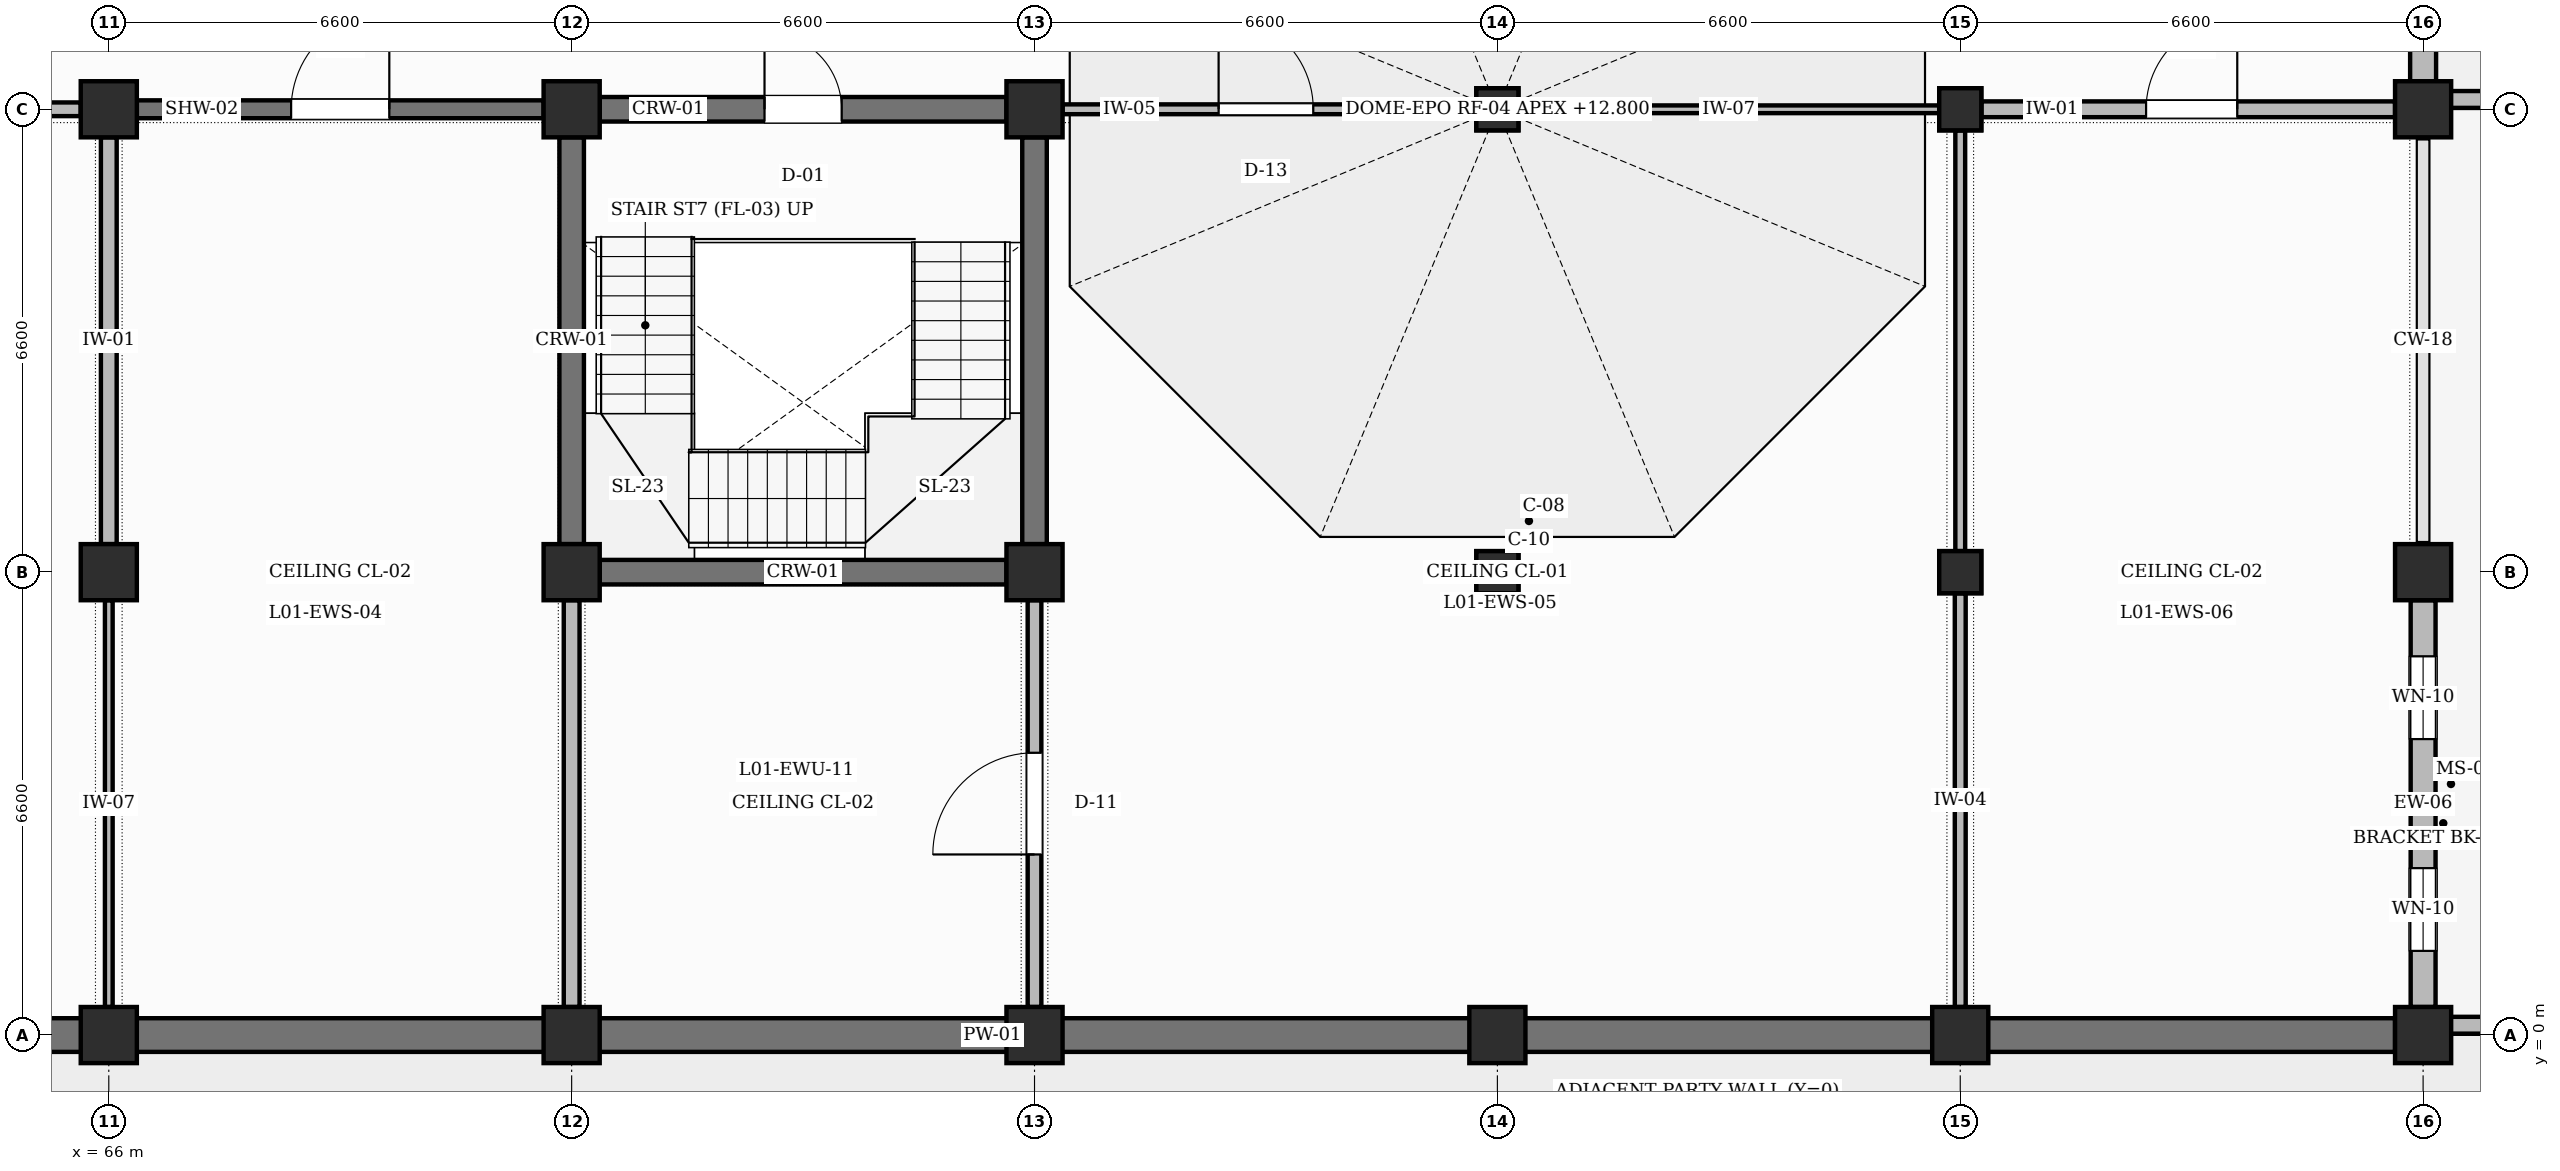
"""IFC4 building model, lengths in metres.
Left out: names, types, materials, properties, quantities, classifications, styles, units other than length and angle.
Written with IfcOpenShell. Run it as: python <this file> out.ifc"""

import sys

from ifc_helpers import new_model, si_unit, direction, frame, frame_2d, origin, origin_2d, place, context, subcontext, project, spatial, rectangle, circle, extrude, element, fill, save


model = new_model("IFC4")
c1 = context("Model", 3, precision=1e-05, world=origin(), true_north=direction((0.0, 1.0)))
c2 = subcontext(c1, "Body", "Model", "MODEL_VIEW")
j1 = project(units=[si_unit("LENGTHUNIT", "METRE"), si_unit("PLANEANGLEUNIT", "RADIAN")], contexts=[c1])
p1 = place(None, origin())
s1 = spatial("IfcSite", under=j1, at=p1, CompositionType="ELEMENT")
p2 = place(p1, origin())
s2 = spatial("IfcBuilding", under=s1, at=p2, CompositionType="ELEMENT")
p3 = place(p2, frame((0.0, 0.0, 5.4)))
s3 = spatial("IfcBuildingStorey", under=s2, at=p3, CompositionType="ELEMENT", Elevation=5.4)
for number, where, z_axis, x_axis in (
    (1, (66.0, 0.0, 0.0), (0.0, 0.0, 1.0), (1.0, 0.0, 0.0)),
    (2, (66.0, 6.6, 0.0), (0.0, 0.0, 1.0), (1.0, 0.0, 0.0)),
    (3, (66.0, 13.2, 0.0), (0.0, 0.0, 1.0), (1.0, 0.0, 0.0)),
    (4, (72.6, 0.0, 0.0), (0.0, 0.0, 1.0), (1.0, 0.0, 0.0)),
    (5, (72.6, 6.6, 0.0), (0.0, 0.0, 1.0), (1.0, 0.0, 0.0)),
    (6, (72.6, 13.2, 0.0), (0.0, 0.0, 1.0), (1.0, 0.0, 0.0)),
    (7, (79.2, 0.0, 0.0), (0.0, 0.0, 1.0), (1.0, 0.0, 0.0)),
    (8, (79.2, 6.6, 0.0), (0.0, 0.0, 1.0), (1.0, 0.0, 0.0)),
    (9, (79.2, 13.2, 0.0), (0.0, 0.0, 1.0), (1.0, 0.0, 0.0)),
    (10, (85.8, 0.0, 0.0), (0.0, 0.0, 1.0), (1.0, 0.0, 0.0)),
):
    element("IfcColumn", number, at=place(p3, frame(where, z_axis=z_axis, x_axis=x_axis)), inside=s3, PredefinedType="COLUMN", context=c2, shape_type="SweptSolid", body=[
        extrude(rectangle(XDim=0.8, YDim=0.8, at=origin_2d()), origin(), (0.0, 0.0, 1.0), 4.8),
    ])
for number, where, z_axis, x_axis in (
    (11, (85.8, 6.6, 0.0), (0.0, 0.0, 1.0), (1.0, 0.0, 0.0)),
    (12, (85.8, 13.2, 0.0), (0.0, 0.0, 1.0), (1.0, 0.0, 0.0)),
):
    element("IfcColumn", number, at=place(p3, frame(where, z_axis=z_axis, x_axis=x_axis)), inside=s3, PredefinedType="COLUMN", context=c2, shape_type="SweptSolid", body=[
        extrude(circle(Radius=0.3, at=origin_2d()), origin(), (0.0, 0.0, 1.0), 4.8),
    ])
p4 = place(p3, frame((92.4, 0.0, 0.0), z_axis=(0.0, 0.0, 1.0), x_axis=(1.0, 0.0, 0.0)))
e13 = element("IfcColumn", 13, at=p4, inside=s3, PredefinedType="COLUMN", context=c2, shape_type="SweptSolid", body=[
    extrude(rectangle(XDim=0.8, YDim=0.8, at=origin_2d()), origin(), (0.0, 0.0, 1.0), 4.8),
])
for number, where, z_axis, x_axis in (
    (14, (92.4, 6.6, 0.0), (0.0, 0.0, 1.0), (1.0, 0.0, 0.0)),
    (15, (92.4, 13.2, 0.0), (0.0, 0.0, 1.0), (1.0, 0.0, 0.0)),
):
    element("IfcColumn", number, at=place(p3, frame(where, z_axis=z_axis, x_axis=x_axis)), inside=s3, PredefinedType="COLUMN", context=c2, shape_type="SweptSolid", body=[
        extrude(circle(Radius=0.3, at=origin_2d()), origin(), (0.0, 0.0, 1.0), 4.8),
    ])
for number, where, z_axis, x_axis in (
    (16, (99.0, 0.0, 0.0), (0.0, 0.0, 1.0), (1.0, 0.0, 0.0)),
    (17, (99.0, 6.6, 0.0), (0.0, 0.0, 1.0), (1.0, 0.0, 0.0)),
    (18, (99.0, 13.2, 0.0), (0.0, 0.0, 1.0), (1.0, 0.0, 0.0)),
):
    element("IfcColumn", number, at=place(p3, frame(where, z_axis=z_axis, x_axis=x_axis)), inside=s3, PredefinedType="COLUMN", context=c2, shape_type="SweptSolid", body=[
        extrude(rectangle(XDim=0.8, YDim=0.8, at=origin_2d()), origin(), (0.0, 0.0, 1.0), 4.8),
    ])
for number, where, z_axis, x_axis in (
    (19, (85.8, 6.6, 4.8), (0.0, 0.0, 1.0), (1.0, 0.0, 0.0)),
    (20, (92.4, 6.6, 4.8), (0.0, 0.0, 1.0), (1.0, 0.0, 0.0)),
    (21, (92.4, 13.2, 4.8), (0.0, 0.0, 1.0), (1.0, 0.0, 0.0)),
):
    element("IfcColumn", number, at=place(p3, frame(where, z_axis=z_axis, x_axis=x_axis)), inside=s3, PredefinedType="COLUMN", context=c2, shape_type="SweptSolid", body=[
        extrude(rectangle(XDim=0.6, YDim=0.6, at=origin_2d()), origin(), (0.0, 0.0, 1.0), 0.65),
    ])
p5 = place(p3, frame((85.8, 13.2, 4.8), z_axis=(0.0, 0.0, 1.0), x_axis=(1.0, 0.0, 0.0)))
e22 = element("IfcColumn", 22, at=p5, inside=s3, PredefinedType="COLUMN", context=c2, shape_type="SweptSolid", body=[
    extrude(rectangle(XDim=0.6, YDim=0.6, at=origin_2d()), origin(), (0.0, 0.0, 1.0), 2.26),
])
for number, where, z_axis, x_axis in (
    (23, (59.8, 0.0, 0.0), (0.0, 0.0, 1.0), (1.0, 0.0, 0.0)),
    (24, (66.4, 0.0, 0.0), (0.0, 0.0, 1.0), (1.0, 0.0, 0.0)),
    (25, (73.0, 0.0, 0.0), (0.0, 0.0, 1.0), (1.0, 0.0, 0.0)),
):
    element("IfcWall", number, at=place(p3, frame(where, z_axis=z_axis, x_axis=x_axis)), inside=s3, PredefinedType="SOLIDWALL", context=c2, shape_type="SweptSolid", body=[
        extrude(rectangle(XDim=5.8, YDim=0.48, at=frame_2d((2.9, 0.0))), origin(), (0.0, 0.0, 1.0), 3.85),
    ])
p6 = place(p3, frame((79.6, 0.0, 0.0), z_axis=(0.0, 0.0, 1.0), x_axis=(1.0, 0.0, 0.0)))
e26 = element("IfcWall", 26, at=p6, inside=s3, PredefinedType="SOLIDWALL", context=c2, shape_type="SweptSolid", body=[
    extrude(rectangle(XDim=5.8, YDim=0.48, at=frame_2d((2.9, 0.0))), origin(), (0.0, 0.0, 1.0), 3.85),
])
for number, where, z_axis, x_axis in (
    (27, (86.2, 0.0, 0.0), (0.0, 0.0, 1.0), (1.0, 0.0, 0.0)),
    (28, (92.8, 0.0, 0.0), (0.0, 0.0, 1.0), (1.0, 0.0, 0.0)),
):
    element("IfcWall", number, at=place(p3, frame(where, z_axis=z_axis, x_axis=x_axis)), inside=s3, PredefinedType="SOLIDWALL", context=c2, shape_type="SweptSolid", body=[
        extrude(rectangle(XDim=5.8, YDim=0.48, at=frame_2d((2.9, 0.0))), origin(), (0.0, 0.0, 1.0), 3.85),
    ])
p7 = place(p3, frame((99.0, 0.4, 0.0), z_axis=(0.0, 0.0, 1.0), x_axis=(0.0, 1.0, 0.0)))
e29 = element("IfcWall", 29, at=p7, inside=s3, PredefinedType="SOLIDWALL", context=c2, shape_type="SweptSolid", body=[
    extrude(rectangle(XDim=5.8, YDim=0.355, at=frame_2d((2.9, 0.0))), origin(), (0.0, 0.0, 1.0), 3.85),
])
p8 = place(p7, frame((0.8, 0.0, 0.95)))
e30 = element("IfcOpeningElement", 30, at=p8, cuts=e29, PredefinedType="OPENING", context=c2, shape_type="SweptSolid", body=[
    extrude(rectangle(XDim=1.18, YDim=1.52, at=frame_2d((0.59, 0.76))), frame((0.0, 0.188, 0.0), z_axis=(0.0, -1.0, 0.0), x_axis=(1.0, 0.0, 0.0)), (0.0, 0.0, 1.0), 0.375),
])
p9 = place(p7, frame((3.82, 0.0, 0.95)))
e31 = element("IfcOpeningElement", 31, at=p9, cuts=e29, PredefinedType="OPENING", context=c2, shape_type="SweptSolid", body=[
    extrude(rectangle(XDim=1.18, YDim=1.52, at=frame_2d((0.59, 0.76))), frame((0.0, 0.188, 0.0), z_axis=(0.0, -1.0, 0.0), x_axis=(1.0, 0.0, 0.0)), (0.0, 0.0, 1.0), 0.375),
])
p10 = place(p3, frame((99.0, 13.6, 0.0), z_axis=(0.0, 0.0, 1.0), x_axis=(0.0, 1.0, 0.0)))
e32 = element("IfcWall", 32, at=p10, inside=s3, PredefinedType="SOLIDWALL", context=c2, shape_type="SweptSolid", body=[
    extrude(rectangle(XDim=5.8, YDim=0.37, at=frame_2d((2.9, 0.0))), origin(), (0.0, 0.0, 1.0), 3.85),
])
p11 = place(p10, frame((2.275, 0.0, 0.0)))
e33 = element("IfcOpeningElement", 33, at=p11, cuts=e32, PredefinedType="OPENING", context=c2, shape_type="SweptSolid", body=[
    extrude(rectangle(XDim=1.25, YDim=2.2, at=frame_2d((0.625, 1.1))), frame((0.0, 0.195, 0.0), z_axis=(0.0, -1.0, 0.0), x_axis=(1.0, 0.0, 0.0)), (0.0, 0.0, 1.0), 0.39),
])
for number, where, z_axis, x_axis in (
    (34, (99.14, 13.34, 0.0), (0.0, 0.0, 1.0), (1.0, 0.0, 0.0)),
    (35, (99.14, 0.14, 0.0), (0.0, 0.0, 1.0), (1.0, 0.0, 0.0)),
):
    element("IfcWall", number, at=place(p3, frame(where, z_axis=z_axis, x_axis=x_axis)), inside=s3, PredefinedType="PARAPET", context=c2, shape_type="SweptSolid", body=[
        extrude(rectangle(XDim=6.32, YDim=0.24, at=frame_2d((3.16, 0.0))), origin(), (0.0, 0.0, 1.0), 1.15),
    ])
p12 = place(p3, frame((73.0, 6.6, 0.0), z_axis=(0.0, 0.0, 1.0), x_axis=(1.0, 0.0, 0.0)))
e36 = element("IfcWall", 36, at=p12, inside=s3, PredefinedType="SHEAR", context=c2, shape_type="SweptSolid", body=[
    extrude(rectangle(XDim=5.8, YDim=0.35, at=frame_2d((2.9, 0.0))), origin(), (0.0, 0.0, 1.0), 3.6),
])
p13 = place(p3, frame((73.0, 13.2, 0.0), z_axis=(0.0, 0.0, 1.0), x_axis=(1.0, 0.0, 0.0)))
e37 = element("IfcWall", 37, at=p13, inside=s3, PredefinedType="SHEAR", context=c2, shape_type="SweptSolid", body=[
    extrude(rectangle(XDim=5.8, YDim=0.35, at=frame_2d((2.9, 0.0))), origin(), (0.0, 0.0, 1.0), 3.7),
])
p14 = place(p13, frame((2.35, 0.0, 0.0)))
e38 = element("IfcOpeningElement", 38, at=p14, cuts=e37, PredefinedType="OPENING", context=c2, shape_type="SweptSolid", body=[
    extrude(rectangle(XDim=1.1, YDim=2.15, at=frame_2d((0.55, 1.075))), frame((0.0, 0.185, 0.0), z_axis=(0.0, -1.0, 0.0), x_axis=(1.0, 0.0, 0.0)), (0.0, 0.0, 1.0), 0.37),
])
for number, where, z_axis, x_axis in (
    (39, (72.6, 7.0, 0.0), (0.0, 0.0, 1.0), (0.0, 1.0, 0.0)),
    (40, (79.2, 7.0, 0.0), (0.0, 0.0, 1.0), (0.0, 1.0, 0.0)),
):
    element("IfcWall", number, at=place(p3, frame(where, z_axis=z_axis, x_axis=x_axis)), inside=s3, PredefinedType="SHEAR", context=c2, shape_type="SweptSolid", body=[
        extrude(rectangle(XDim=5.8, YDim=0.35, at=frame_2d((2.9, 0.0))), origin(), (0.0, 0.0, 1.0), 3.7),
    ])
p15 = place(p3, frame((66.0, 0.4, 0.0), z_axis=(0.0, 0.0, 1.0), x_axis=(0.0, 1.0, 0.0)))
e41 = element("IfcWall", 41, at=p15, inside=s3, PredefinedType="PARTITIONING", context=c2, shape_type="SweptSolid", body=[
    extrude(rectangle(XDim=5.8, YDim=0.11, at=frame_2d((2.9, 0.0))), origin(), (0.0, 0.0, 1.0), 3.7),
])
p16 = place(p3, frame((66.0, 7.0, 0.0), z_axis=(0.0, 0.0, 1.0), x_axis=(0.0, 1.0, 0.0)))
e42 = element("IfcWall", 42, at=p16, inside=s3, PredefinedType="PARTITIONING", context=c2, shape_type="SweptSolid", body=[
    extrude(rectangle(XDim=5.8, YDim=0.225, at=frame_2d((2.9, 0.0))), origin(), (0.0, 0.0, 1.0), 3.7),
])
p17 = place(p3, frame((59.8, 13.2, 0.0), z_axis=(0.0, 0.0, 1.0), x_axis=(1.0, 0.0, 0.0)))
e43 = element("IfcWall", 43, at=p17, inside=s3, PredefinedType="PARTITIONING", context=c2, shape_type="SweptSolid", body=[
    extrude(rectangle(XDim=5.8, YDim=0.195, at=frame_2d((2.9, 0.0))), origin(), (0.0, 0.0, 1.0), 3.7),
])
p18 = place(p3, frame((72.6, 0.4, 0.0), z_axis=(0.0, 0.0, 1.0), x_axis=(0.0, 1.0, 0.0)))
e44 = element("IfcWall", 44, at=p18, inside=s3, PredefinedType="PARTITIONING", context=c2, shape_type="SweptSolid", body=[
    extrude(rectangle(XDim=5.8, YDim=0.225, at=frame_2d((2.9, 0.0))), origin(), (0.0, 0.0, 1.0), 3.7),
])
p19 = place(p3, frame((66.4, 13.2, 0.0), z_axis=(0.0, 0.0, 1.0), x_axis=(1.0, 0.0, 0.0)))
e45 = element("IfcWall", 45, at=p19, inside=s3, PredefinedType="SHEAR", context=c2, shape_type="SweptSolid", body=[
    extrude(rectangle(XDim=5.8, YDim=0.255, at=frame_2d((2.9, 0.0))), origin(), (0.0, 0.0, 1.0), 3.6),
])
p20 = place(p19, frame((2.2, 0.0, 0.0)))
e46 = element("IfcOpeningElement", 46, at=p20, cuts=e45, PredefinedType="OPENING", context=c2, shape_type="SweptSolid", body=[
    extrude(rectangle(XDim=1.4, YDim=2.25, at=frame_2d((0.7, 1.125))), frame((0.0, 0.137, 0.0), z_axis=(0.0, -1.0, 0.0), x_axis=(1.0, 0.0, 0.0)), (0.0, 0.0, 1.0), 0.275),
])
p21 = place(p3, frame((79.2, 0.4, 0.0), z_axis=(0.0, 0.0, 1.0), x_axis=(0.0, 1.0, 0.0)))
e47 = element("IfcWall", 47, at=p21, inside=s3, PredefinedType="PARTITIONING", context=c2, shape_type="SweptSolid", body=[
    extrude(rectangle(XDim=5.8, YDim=0.195, at=frame_2d((2.9, 0.0))), origin(), (0.0, 0.0, 1.0), 3.7),
])
p22 = place(p21, frame((2.175, 0.0, 0.0)))
e48 = element("IfcOpeningElement", 48, at=p22, cuts=e47, PredefinedType="OPENING", context=c2, shape_type="SweptSolid", body=[
    extrude(rectangle(XDim=1.45, YDim=2.25, at=frame_2d((0.725, 1.125))), frame((0.0, 0.107, 0.0), z_axis=(0.0, -1.0, 0.0), x_axis=(1.0, 0.0, 0.0)), (0.0, 0.0, 1.0), 0.215),
])
p23 = place(p3, frame((79.6, 13.2, 0.0), z_axis=(0.0, 0.0, 1.0), x_axis=(1.0, 0.0, 0.0)))
e49 = element("IfcWall", 49, at=p23, inside=s3, PredefinedType="PARTITIONING", context=c2, shape_type="SweptSolid", body=[
    extrude(rectangle(XDim=5.9, YDim=0.14, at=frame_2d((2.95, 0.0))), origin(), (0.0, 0.0, 1.0), 3.6),
])
p24 = place(p23, frame((2.225, 0.0, 0.0)))
e50 = element("IfcOpeningElement", 50, at=p24, cuts=e49, PredefinedType="OPENING", context=c2, shape_type="SweptSolid", body=[
    extrude(rectangle(XDim=1.35, YDim=2.3, at=frame_2d((0.675, 1.15))), frame((0.0, 0.08, 0.0), z_axis=(0.0, -1.0, 0.0), x_axis=(1.0, 0.0, 0.0)), (0.0, 0.0, 1.0), 0.16),
])
p25 = place(p3, frame((92.4, 0.4, 0.0), z_axis=(0.0, 0.0, 1.0), x_axis=(0.0, 1.0, 0.0)))
e51 = element("IfcWall", 51, at=p25, inside=s3, PredefinedType="PARTITIONING", context=c2, shape_type="SweptSolid", body=[
    extrude(rectangle(XDim=5.9, YDim=0.155, at=frame_2d((2.95, 0.0))), origin(), (0.0, 0.0, 1.0), 3.7),
])
p26 = place(p3, frame((92.4, 6.9, 0.0), z_axis=(0.0, 0.0, 1.0), x_axis=(0.0, 1.0, 0.0)))
e52 = element("IfcWall", 52, at=p26, inside=s3, PredefinedType="PARTITIONING", context=c2, shape_type="SweptSolid", body=[
    extrude(rectangle(XDim=6.0, YDim=0.14, at=frame_2d((3.0, 0.0))), origin(), (0.0, 0.0, 1.0), 3.7),
])
p27 = place(p3, frame((86.1, 13.2, 0.0), z_axis=(0.0, 0.0, 1.0), x_axis=(1.0, 0.0, 0.0)))
e53 = element("IfcWall", 53, at=p27, inside=s3, PredefinedType="PARTITIONING", context=c2, shape_type="SweptSolid", body=[
    extrude(rectangle(XDim=6.0, YDim=0.11, at=frame_2d((3.0, 0.0))), origin(), (0.0, 0.0, 1.0), 3.7),
])
p28 = place(p3, frame((92.7, 13.2, 0.0), z_axis=(0.0, 0.0, 1.0), x_axis=(1.0, 0.0, 0.0)))
e54 = element("IfcWall", 54, at=p28, inside=s3, PredefinedType="PARTITIONING", context=c2, shape_type="SweptSolid", body=[
    extrude(rectangle(XDim=5.9, YDim=0.225, at=frame_2d((2.95, 0.0))), origin(), (0.0, 0.0, 1.0), 3.6),
])
p29 = place(p28, frame((2.35, 0.0, 0.0)))
e55 = element("IfcOpeningElement", 55, at=p29, cuts=e54, PredefinedType="OPENING", context=c2, shape_type="SweptSolid", body=[
    extrude(rectangle(XDim=1.3, YDim=2.3, at=frame_2d((0.65, 1.15))), frame((0.0, 0.123, 0.0), z_axis=(0.0, -1.0, 0.0), x_axis=(1.0, 0.0, 0.0)), (0.0, 0.0, 1.0), 0.245),
])
p30 = place(p8, origin())
e56 = element("IfcWindow", 56, at=p30, inside=s3, PartitioningType="SINGLE_PANEL", PredefinedType="WINDOW", context=c2, shape_type="SweptSolid", body=[
    extrude(rectangle(XDim=1.18, YDim=1.52, at=frame_2d((0.59, 0.76))), frame((0.0, 0.03, 0.0), z_axis=(0.0, -1.0, 0.0), x_axis=(1.0, 0.0, 0.0)), (0.0, 0.0, 1.0), 0.06),
])
fill(e30, e56)
p31 = place(p9, origin())
e57 = element("IfcWindow", 57, at=p31, inside=s3, PartitioningType="SINGLE_PANEL", PredefinedType="WINDOW", context=c2, shape_type="SweptSolid", body=[
    extrude(rectangle(XDim=1.18, YDim=1.52, at=frame_2d((0.59, 0.76))), frame((0.0, 0.03, 0.0), z_axis=(0.0, -1.0, 0.0), x_axis=(1.0, 0.0, 0.0)), (0.0, 0.0, 1.0), 0.06),
])
fill(e31, e57)
p32 = place(p14, origin())
e58 = element("IfcDoor", 58, at=p32, inside=s3, OperationType="SINGLE_SWING_LEFT", PredefinedType="DOOR", context=c2, shape_type="SweptSolid", body=[
    extrude(rectangle(XDim=1.1, YDim=2.15, at=frame_2d((0.55, 1.075))), frame((0.0, 0.025, 0.0), z_axis=(0.0, -1.0, 0.0), x_axis=(1.0, 0.0, 0.0)), (0.0, 0.0, 1.0), 0.05),
])
fill(e38, e58)
p33 = place(p20, origin())
e59 = element("IfcDoor", 59, at=p33, inside=s3, OperationType="SINGLE_SWING_RIGHT", PredefinedType="DOOR", context=c2, shape_type="SweptSolid", body=[
    extrude(rectangle(XDim=1.4, YDim=2.25, at=frame_2d((0.7, 1.125))), frame((0.0, 0.025, 0.0), z_axis=(0.0, -1.0, 0.0), x_axis=(1.0, 0.0, 0.0)), (0.0, 0.0, 1.0), 0.05),
])
fill(e46, e59)
p34 = place(p24, origin())
e60 = element("IfcDoor", 60, at=p34, inside=s3, OperationType="SINGLE_SWING_LEFT", PredefinedType="DOOR", context=c2, shape_type="SweptSolid", body=[
    extrude(rectangle(XDim=1.35, YDim=2.3, at=frame_2d((0.675, 1.15))), frame((0.0, 0.025, 0.0), z_axis=(0.0, -1.0, 0.0), x_axis=(1.0, 0.0, 0.0)), (0.0, 0.0, 1.0), 0.05),
])
fill(e50, e60)
p35 = place(p29, origin())
e61 = element("IfcDoor", 61, at=p35, inside=s3, OperationType="SINGLE_SWING_RIGHT", PredefinedType="DOOR", context=c2, shape_type="SweptSolid", body=[
    extrude(rectangle(XDim=1.3, YDim=2.3, at=frame_2d((0.65, 1.15))), frame((0.0, 0.025, 0.0), z_axis=(0.0, -1.0, 0.0), x_axis=(1.0, 0.0, 0.0)), (0.0, 0.0, 1.0), 0.05),
])
fill(e55, e61)
p36 = place(p22, origin())
e62 = element("IfcDoor", 62, at=p36, inside=s3, OperationType="SINGLE_SWING_LEFT", PredefinedType="DOOR", context=c2, shape_type="SweptSolid", body=[
    extrude(rectangle(XDim=1.45, YDim=2.25, at=frame_2d((0.725, 1.125))), frame((0.0, 0.025, 0.0), z_axis=(0.0, -1.0, 0.0), x_axis=(1.0, 0.0, 0.0)), (0.0, 0.0, 1.0), 0.05),
])
fill(e48, e62)
save(model, sys.argv[1])
